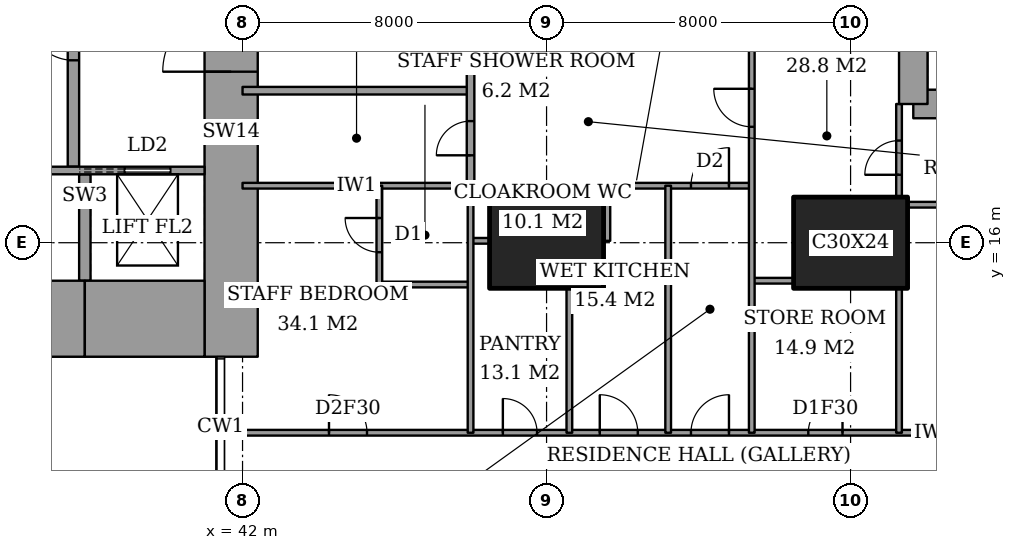
"""IFC4 building model, lengths in metres.
Left out: names, types, materials, properties, quantities, classifications, styles, units other than length and angle.
Written with IfcOpenShell. Run it as: python <this file> out.ifc"""

import sys

from ifc_helpers import new_model, si_unit, direction, frame, frame_2d, origin, origin_2d, place, context, subcontext, project, spatial, rectangle, extrude, element, fill, save


model = new_model("IFC4")
c1 = context("Model", 3, precision=1e-05, world=origin(), true_north=direction((0.0, 1.0)))
c2 = subcontext(c1, "Body", "Model", "MODEL_VIEW")
j1 = project(units=[si_unit("LENGTHUNIT", "METRE"), si_unit("PLANEANGLEUNIT", "RADIAN")], contexts=[c1])
p1 = place(None, origin())
s1 = spatial("IfcSite", under=j1, at=p1, CompositionType="ELEMENT")
p2 = place(p1, origin())
s2 = spatial("IfcBuilding", under=s1, at=p2, CompositionType="ELEMENT")
p3 = place(p2, frame((0.0, 0.0, 234.0)))
s3 = spatial("IfcBuildingStorey", under=s2, at=p3, CompositionType="ELEMENT", Elevation=234.0)
for number, where, z_axis, x_axis in (
    (1, (50.0, 16.0, 0.0), (0.0, 0.0, 1.0), (1.0, 0.0, 0.0)),
    (2, (58.0, 16.0, 0.0), (0.0, 0.0, 1.0), (1.0, 0.0, 0.0)),
):
    element("IfcColumn", number, at=place(p3, frame(where, z_axis=z_axis, x_axis=x_axis)), inside=s3, PredefinedType="COLUMN", context=c2, shape_type="SweptSolid", body=[
        extrude(rectangle(XDim=3.0, YDim=2.4, at=origin_2d()), origin(), (0.0, 0.0, 1.0), 3.6),
    ])
p4 = place(p3, frame((28.15, 14.0, 0.0), z_axis=(0.0, 0.0, 1.0), x_axis=(1.0, 0.0, 0.0)))
e3 = element("IfcWall", 3, at=p4, inside=s3, PredefinedType="SHEAR", context=c2, shape_type="SweptSolid", body=[
    extrude(rectangle(XDim=9.7, YDim=2.0, at=frame_2d((4.85, 0.0))), origin(), (0.0, 0.0, 1.0), 3.6),
])
p5 = place(p3, frame((37.85, 14.0, 0.0), z_axis=(0.0, 0.0, 1.0), x_axis=(1.0, 0.0, 0.0)))
e4 = element("IfcWall", 4, at=p5, inside=s3, PredefinedType="SHEAR", context=c2, shape_type="SweptSolid", body=[
    extrude(rectangle(XDim=3.15, YDim=2.0, at=frame_2d((1.575, 0.0))), origin(), (0.0, 0.0, 1.0), 3.6),
])
p6 = place(p3, frame((41.7, 13.0, 0.0), z_axis=(0.0, 0.0, 1.0), x_axis=(0.0, 1.0, 0.0)))
e5 = element("IfcWall", 5, at=p6, inside=s3, PredefinedType="SHEAR", context=c2, shape_type="SweptSolid", body=[
    extrude(rectangle(XDim=11.85, YDim=1.4, at=frame_2d((5.925, 0.0))), origin(), (0.0, 0.0, 1.0), 3.6),
])
p7 = place(p6, frame((7.5, 0.0, 0.0)))
e6 = element("IfcOpeningElement", 6, at=p7, cuts=e5, PredefinedType="OPENING", context=c2, shape_type="SweptSolid", body=[
    extrude(rectangle(XDim=1.8, YDim=2.4, at=frame_2d((0.9, 1.2))), frame((0.0, 0.71, 0.0), z_axis=(0.0, -1.0, 0.0), x_axis=(1.0, 0.0, 0.0)), (0.0, 0.0, 1.0), 1.42),
])
p8 = place(p3, frame((37.55, 18.0, 0.0), z_axis=(0.0, 0.0, 1.0), x_axis=(0.0, 1.0, 0.0)))
e7 = element("IfcWall", 7, at=p8, inside=s3, PredefinedType="PARTITIONING", context=c2, shape_type="SweptSolid", body=[
    extrude(rectangle(XDim=6.7, YDim=0.3, at=frame_2d((3.35, 0.0))), origin(), (0.0, 0.0, 1.0), 3.6),
])
p9 = place(p8, frame((2.8, 0.0, 0.0)))
e8 = element("IfcOpeningElement", 8, at=p9, cuts=e7, PredefinedType="OPENING", context=c2, shape_type="SweptSolid", body=[
    extrude(rectangle(XDim=1.2, YDim=2.1, at=frame_2d((0.6, 1.05))), frame((0.0, 0.16, 0.0), z_axis=(0.0, -1.0, 0.0), x_axis=(1.0, 0.0, 0.0)), (0.0, 0.0, 1.0), 0.32),
])
p10 = place(p3, frame((59.65, 19.65, 0.0), z_axis=(0.0, 0.0, 1.0), x_axis=(1.0, 0.0, 0.0)))
e9 = element("IfcWall", 9, at=p10, inside=s3, PredefinedType="SHEAR", context=c2, shape_type="SweptSolid", body=[
    extrude(rectangle(XDim=4.45, YDim=0.75, at=frame_2d((2.225, 0.0))), origin(), (0.0, 0.0, 1.0), 3.6),
])
p11 = place(p3, frame((59.65, 28.35, 0.0), z_axis=(0.0, 0.0, 1.0), x_axis=(0.0, -1.0, 0.0)))
e10 = element("IfcWall", 10, at=p11, inside=s3, PredefinedType="SHEAR", context=c2, shape_type="SweptSolid", body=[
    extrude(rectangle(XDim=8.7, YDim=0.75, at=frame_2d((4.35, 0.0))), origin(), (0.0, 0.0, 1.0), 3.6),
])
p12 = place(p11, frame((0.975, 0.0, 0.0)))
e11 = element("IfcOpeningElement", 11, at=p12, cuts=e10, PredefinedType="OPENING", context=c2, shape_type="SweptSolid", body=[
    extrude(rectangle(XDim=1.0, YDim=2.1, at=frame_2d((0.5, 1.05))), frame((0.0, 0.385, 0.0), z_axis=(0.0, -1.0, 0.0), x_axis=(1.0, 0.0, 0.0)), (0.0, 0.0, 1.0), 0.77),
])
p13 = place(p3, frame((41.439, 11.0, 0.0), z_axis=(0.0, 0.0, 1.0), x_axis=(1.0, 0.0, 0.0)))
e12 = element("IfcWall", 12, at=p13, inside=s3, PredefinedType="PARTITIONING", context=c2, shape_type="SweptSolid", body=[
    extrude(rectangle(XDim=25.011, YDim=0.15, at=frame_2d((12.505, 0.0))), origin(), (0.0, 0.0, 1.0), 3.35),
])
p14 = place(p13, frame((12.361, 0.0, 0.0)))
e13 = element("IfcOpeningElement", 13, at=p14, cuts=e12, PredefinedType="OPENING", context=c2, shape_type="SweptSolid", body=[
    extrude(rectangle(XDim=1.0, YDim=2.1, at=frame_2d((0.5, 1.05))), frame((0.0, 0.085, 0.0), z_axis=(0.0, -1.0, 0.0), x_axis=(1.0, 0.0, 0.0)), (0.0, 0.0, 1.0), 0.17),
])
p15 = place(p13, frame((20.924, 0.0, 0.0)))
e14 = element("IfcOpeningElement", 14, at=p15, cuts=e12, PredefinedType="OPENING", context=c2, shape_type="SweptSolid", body=[
    extrude(rectangle(XDim=1.0, YDim=2.1, at=frame_2d((0.5, 1.05))), frame((0.0, 0.085, 0.0), z_axis=(0.0, -1.0, 0.0), x_axis=(1.0, 0.0, 0.0)), (0.0, 0.0, 1.0), 0.17),
])
p16 = place(p13, frame((15.448, 0.0, 0.0)))
e15 = element("IfcOpeningElement", 15, at=p16, cuts=e12, PredefinedType="OPENING", context=c2, shape_type="SweptSolid", body=[
    extrude(rectangle(XDim=0.9, YDim=2.1, at=frame_2d((0.45, 1.05))), frame((0.0, 0.085, 0.0), z_axis=(0.0, -1.0, 0.0), x_axis=(1.0, 0.0, 0.0)), (0.0, 0.0, 1.0), 0.17),
])
p17 = place(p13, frame((9.961, 0.0, 0.0)))
e16 = element("IfcOpeningElement", 16, at=p17, cuts=e12, PredefinedType="OPENING", context=c2, shape_type="SweptSolid", body=[
    extrude(rectangle(XDim=1.0, YDim=2.1, at=frame_2d((0.5, 1.05))), frame((0.0, 0.085, 0.0), z_axis=(0.0, -1.0, 0.0), x_axis=(1.0, 0.0, 0.0)), (0.0, 0.0, 1.0), 0.17),
])
p18 = place(p13, frame((7.411, 0.0, 0.0)))
e17 = element("IfcOpeningElement", 17, at=p18, cuts=e12, PredefinedType="OPENING", context=c2, shape_type="SweptSolid", body=[
    extrude(rectangle(XDim=0.9, YDim=2.1, at=frame_2d((0.45, 1.05))), frame((0.0, 0.085, 0.0), z_axis=(0.0, -1.0, 0.0), x_axis=(1.0, 0.0, 0.0)), (0.0, 0.0, 1.0), 0.17),
])
p19 = place(p13, frame((2.836, 0.0, 0.0)))
e18 = element("IfcOpeningElement", 18, at=p19, cuts=e12, PredefinedType="OPENING", context=c2, shape_type="SweptSolid", body=[
    extrude(rectangle(XDim=1.0, YDim=2.1, at=frame_2d((0.5, 1.05))), frame((0.0, 0.085, 0.0), z_axis=(0.0, -1.0, 0.0), x_axis=(1.0, 0.0, 0.0)), (0.0, 0.0, 1.0), 0.17),
])
p20 = place(p3, frame((45.6, 14.9, 0.0), z_axis=(0.0, 0.0, 1.0), x_axis=(1.0, 0.0, 0.0)))
e19 = element("IfcWall", 19, at=p20, inside=s3, PredefinedType="PARTITIONING", context=c2, shape_type="SweptSolid", body=[
    extrude(rectangle(XDim=2.4, YDim=0.15, at=frame_2d((1.2, 0.0))), origin(), (0.0, 0.0, 1.0), 3.35),
])
p21 = place(p3, frame((55.4, 15.0, 0.0), z_axis=(0.0, 0.0, 1.0), x_axis=(1.0, 0.0, 0.0)))
e20 = element("IfcWall", 20, at=p21, inside=s3, PredefinedType="PARTITIONING", context=c2, shape_type="SweptSolid", body=[
    extrude(rectangle(XDim=1.1, YDim=0.15, at=frame_2d((0.55, 0.0))), origin(), (0.0, 0.0, 1.0), 3.35),
])
p22 = place(p3, frame((48.0, 16.05, 0.0), z_axis=(0.0, 0.0, 1.0), x_axis=(1.0, 0.0, 0.0)))
e21 = element("IfcWall", 21, at=p22, inside=s3, PredefinedType="PARTITIONING", context=c2, shape_type="SweptSolid", body=[
    extrude(rectangle(XDim=0.5, YDim=0.15, at=frame_2d((0.25, 0.0))), origin(), (0.0, 0.0, 1.0), 2.634),
])
p23 = place(p3, frame((59.5, 17.0, 0.0), z_axis=(0.0, 0.0, 1.0), x_axis=(1.0, 0.0, 0.0)))
e22 = element("IfcWall", 22, at=p23, inside=s3, PredefinedType="PARTITIONING", context=c2, shape_type="SweptSolid", body=[
    extrude(rectangle(XDim=6.95, YDim=0.15, at=frame_2d((3.475, 0.0))), origin(), (0.0, 0.0, 1.0), 3.35),
])
p24 = place(p3, frame((42.0, 17.5, 0.0), z_axis=(0.0, 0.0, 1.0), x_axis=(1.0, 0.0, 0.0)))
e23 = element("IfcWall", 23, at=p24, inside=s3, PredefinedType="PARTITIONING", context=c2, shape_type="SweptSolid", body=[
    extrude(rectangle(XDim=6.0, YDim=0.15, at=frame_2d((3.0, 0.0))), origin(), (0.0, 0.0, 1.0), 3.35),
])
p25 = place(p3, frame((51.6, 17.5, 0.0), z_axis=(0.0, 0.0, 1.0), x_axis=(1.0, 0.0, 0.0)))
e24 = element("IfcWall", 24, at=p25, inside=s3, PredefinedType="PARTITIONING", context=c2, shape_type="SweptSolid", body=[
    extrude(rectangle(XDim=3.8, YDim=0.15, at=frame_2d((1.9, 0.0))), origin(), (0.0, 0.0, 1.0), 3.35),
])
p26 = place(p25, frame((2.2, 0.0, 0.0)))
e25 = element("IfcOpeningElement", 25, at=p26, cuts=e24, PredefinedType="OPENING", context=c2, shape_type="SweptSolid", body=[
    extrude(rectangle(XDim=1.0, YDim=2.1, at=frame_2d((0.5, 1.05))), frame((0.0, 0.085, 0.0), z_axis=(0.0, -1.0, 0.0), x_axis=(1.0, 0.0, 0.0)), (0.0, 0.0, 1.0), 0.17),
])
p27 = place(p3, frame((42.0, 20.0, 0.0), z_axis=(0.0, 0.0, 1.0), x_axis=(1.0, 0.0, 0.0)))
e26 = element("IfcWall", 26, at=p27, inside=s3, PredefinedType="PARTITIONING", context=c2, shape_type="SweptSolid", body=[
    extrude(rectangle(XDim=6.0, YDim=0.2, at=frame_2d((3.0, 0.0))), origin(), (0.0, 0.0, 1.0), 3.35),
])
p28 = place(p3, frame((45.6, 14.9, 0.0), z_axis=(0.0, 0.0, 1.0), x_axis=(0.0, 1.0, 0.0)))
e27 = element("IfcWall", 27, at=p28, inside=s3, PredefinedType="PARTITIONING", context=c2, shape_type="SweptSolid", body=[
    extrude(rectangle(XDim=2.6, YDim=0.15, at=frame_2d((1.3, 0.0))), origin(), (0.0, 0.0, 1.0), 3.35),
])
p29 = place(p28, frame((0.85, 0.0, 0.0)))
e28 = element("IfcOpeningElement", 28, at=p29, cuts=e27, PredefinedType="OPENING", context=c2, shape_type="SweptSolid", body=[
    extrude(rectangle(XDim=0.9, YDim=2.1, at=frame_2d((0.45, 1.05))), frame((0.0, 0.085, 0.0), z_axis=(0.0, -1.0, 0.0), x_axis=(1.0, 0.0, 0.0)), (0.0, 0.0, 1.0), 0.17),
])
p30 = place(p3, frame((48.0, 17.5, 0.0), z_axis=(0.0, 0.0, 1.0), x_axis=(0.0, 1.0, 0.0)))
e29 = element("IfcWall", 29, at=p30, inside=s3, PredefinedType="PARTITIONING", context=c2, shape_type="SweptSolid", body=[
    extrude(rectangle(XDim=6.5, YDim=0.2, at=frame_2d((3.25, 0.0))), origin(), (0.0, 0.0, 1.0), 3.35),
])
p31 = place(p30, frame((3.9, 0.0, 0.0)))
e30 = element("IfcOpeningElement", 30, at=p31, cuts=e29, PredefinedType="OPENING", context=c2, shape_type="SweptSolid", body=[
    extrude(rectangle(XDim=1.2, YDim=2.4, at=frame_2d((0.6, 1.2))), frame((0.0, 0.11, 0.0), z_axis=(0.0, -1.0, 0.0), x_axis=(1.0, 0.0, 0.0)), (0.0, 0.0, 1.0), 0.22),
])
p32 = place(p30, frame((0.8, 0.0, 0.0)))
e31 = element("IfcOpeningElement", 31, at=p32, cuts=e29, PredefinedType="OPENING", context=c2, shape_type="SweptSolid", body=[
    extrude(rectangle(XDim=0.9, YDim=2.1, at=frame_2d((0.45, 1.05))), frame((0.0, 0.11, 0.0), z_axis=(0.0, -1.0, 0.0), x_axis=(1.0, 0.0, 0.0)), (0.0, 0.0, 1.0), 0.22),
])
p33 = place(p3, frame((48.0, 11.0, 0.0), z_axis=(0.0, 0.0, 1.0), x_axis=(0.0, 1.0, 0.0)))
e32 = element("IfcWall", 32, at=p33, inside=s3, PredefinedType="PARTITIONING", context=c2, shape_type="SweptSolid", body=[
    extrude(rectangle(XDim=6.5, YDim=0.15, at=frame_2d((3.25, 0.0))), origin(), (0.0, 0.0, 1.0), 3.35),
])
p34 = place(p3, frame((50.6, 11.0, 0.0), z_axis=(0.0, 0.0, 1.0), x_axis=(0.0, 1.0, 0.0)))
e33 = element("IfcWall", 33, at=p34, inside=s3, PredefinedType="PARTITIONING", context=c2, shape_type="SweptSolid", body=[
    extrude(rectangle(XDim=3.8, YDim=0.15, at=frame_2d((1.9, 0.0))), origin(), (0.0, 0.0, 1.0), 3.35),
])
p35 = place(p3, frame((51.6, 16.05, 0.0), z_axis=(0.0, 0.0, 1.0), x_axis=(0.0, 1.0, 0.0)))
e34 = element("IfcWall", 34, at=p35, inside=s3, PredefinedType="PARTITIONING", context=c2, shape_type="SweptSolid", body=[
    extrude(rectangle(XDim=1.45, YDim=0.15, at=frame_2d((0.725, 0.0))), origin(), (0.0, 0.0, 1.0), 3.35),
])
p36 = place(p3, frame((53.2, 11.0, 0.0), z_axis=(0.0, 0.0, 1.0), x_axis=(0.0, 1.0, 0.0)))
e35 = element("IfcWall", 35, at=p36, inside=s3, PredefinedType="PARTITIONING", context=c2, shape_type="SweptSolid", body=[
    extrude(rectangle(XDim=6.5, YDim=0.15, at=frame_2d((3.25, 0.0))), origin(), (0.0, 0.0, 1.0), 3.35),
])
p37 = place(p3, frame((55.4, 11.0, 0.0), z_axis=(0.0, 0.0, 1.0), x_axis=(0.0, 1.0, 0.0)))
e36 = element("IfcWall", 36, at=p37, inside=s3, PredefinedType="PARTITIONING", context=c2, shape_type="SweptSolid", body=[
    extrude(rectangle(XDim=10.6, YDim=0.15, at=frame_2d((5.3, 0.0))), origin(), (0.0, 0.0, 1.0), 3.35),
])
p38 = place(p37, frame((8.05, 0.0, 0.0)))
e37 = element("IfcOpeningElement", 37, at=p38, cuts=e36, PredefinedType="OPENING", context=c2, shape_type="SweptSolid", body=[
    extrude(rectangle(XDim=1.0, YDim=2.1, at=frame_2d((0.5, 1.05))), frame((0.0, 0.085, 0.0), z_axis=(0.0, -1.0, 0.0), x_axis=(1.0, 0.0, 0.0)), (0.0, 0.0, 1.0), 0.17),
])
p39 = place(p3, frame((59.275, 11.0, 0.0), z_axis=(0.0, 0.0, 1.0), x_axis=(0.0, 1.0, 0.0)))
e38 = element("IfcWall", 38, at=p39, inside=s3, PredefinedType="PARTITIONING", context=c2, shape_type="SweptSolid", body=[
    extrude(rectangle(XDim=3.8, YDim=0.15, at=frame_2d((1.9, 0.0))), origin(), (0.0, 0.0, 1.0), 3.35),
])
p40 = place(p3, frame((59.275, 17.2, 0.0), z_axis=(0.0, 0.0, 1.0), x_axis=(0.0, 1.0, 0.0)))
e39 = element("IfcWall", 39, at=p40, inside=s3, PredefinedType="PARTITIONING", context=c2, shape_type="SweptSolid", body=[
    extrude(rectangle(XDim=2.45, YDim=0.15, at=frame_2d((1.225, 0.0))), origin(), (0.0, 0.0, 1.0), 3.35),
])
p41 = place(p40, frame((0.587, 0.0, 0.0)))
e40 = element("IfcOpeningElement", 40, at=p41, cuts=e39, PredefinedType="OPENING", context=c2, shape_type="SweptSolid", body=[
    extrude(rectangle(XDim=0.9, YDim=2.1, at=frame_2d((0.45, 1.05))), frame((0.0, 0.085, 0.0), z_axis=(0.0, -1.0, 0.0), x_axis=(1.0, 0.0, 0.0)), (0.0, 0.0, 1.0), 0.17),
])
p42 = place(p3, frame((28.3, 17.9, 0.0), z_axis=(0.0, 0.0, 1.0), x_axis=(1.0, 0.0, 0.0)))
e41 = element("IfcWall", 41, at=p42, inside=s3, PredefinedType="PARTITIONING", context=c2, shape_type="SweptSolid", body=[
    extrude(rectangle(XDim=12.7, YDim=0.2, at=frame_2d((6.35, 0.0))), origin(), (0.0, 0.0, 1.0), 3.6),
])
p43 = place(p42, frame((1.0, 0.0, 0.0)))
e42 = element("IfcOpeningElement", 42, at=p43, cuts=e41, PredefinedType="OPENING", context=c2, shape_type="SweptSolid", body=[
    extrude(rectangle(XDim=1.0, YDim=2.1, at=frame_2d((0.5, 1.05))), frame((0.0, 0.11, 0.0), z_axis=(0.0, -1.0, 0.0), x_axis=(1.0, 0.0, 0.0)), (0.0, 0.0, 1.0), 0.22),
])
p44 = place(p42, frame((10.6, 0.0, 0.0)))
e43 = element("IfcOpeningElement", 43, at=p44, cuts=e41, PredefinedType="OPENING", context=c2, shape_type="SweptSolid", body=[
    extrude(rectangle(XDim=1.2, YDim=2.1, at=frame_2d((0.6, 1.05))), frame((0.0, 0.11, 0.0), z_axis=(0.0, -1.0, 0.0), x_axis=(1.0, 0.0, 0.0)), (0.0, 0.0, 1.0), 0.22),
])
p45 = place(p3, frame((37.85, 15.0, 0.0), z_axis=(0.0, 0.0, 1.0), x_axis=(0.0, 1.0, 0.0)))
e44 = element("IfcWall", 44, at=p45, inside=s3, PredefinedType="SHEAR", context=c2, shape_type="SweptSolid", body=[
    extrude(rectangle(XDim=2.8, YDim=0.3, at=frame_2d((1.4, 0.0))), origin(), (0.0, 0.0, 1.0), 3.6),
])
p46 = place(p14, origin())
e45 = element("IfcDoor", 45, at=p46, inside=s3, OperationType="SINGLE_SWING_LEFT", PredefinedType="DOOR", context=c2, shape_type="SweptSolid", body=[
    extrude(rectangle(XDim=1.0, YDim=2.1, at=frame_2d((0.5, 1.05))), frame((0.0, 0.025, 0.0), z_axis=(0.0, -1.0, 0.0), x_axis=(1.0, 0.0, 0.0)), (0.0, 0.0, 1.0), 0.05),
])
fill(e13, e45)
p47 = place(p41, origin())
e46 = element("IfcDoor", 46, at=p47, inside=s3, OperationType="SINGLE_SWING_RIGHT", PredefinedType="DOOR", context=c2, shape_type="SweptSolid", body=[
    extrude(rectangle(XDim=0.9, YDim=2.1, at=frame_2d((0.45, 1.05))), frame((0.0, 0.025, 0.0), z_axis=(0.0, -1.0, 0.0), x_axis=(1.0, 0.0, 0.0)), (0.0, 0.0, 1.0), 0.05),
])
fill(e40, e46)
p48 = place(p16, origin())
e47 = element("IfcDoor", 47, at=p48, inside=s3, OperationType="SINGLE_SWING_LEFT", PredefinedType="DOOR", context=c2, shape_type="SweptSolid", body=[
    extrude(rectangle(XDim=0.9, YDim=2.1, at=frame_2d((0.45, 1.05))), frame((0.0, 0.025, 0.0), z_axis=(0.0, -1.0, 0.0), x_axis=(1.0, 0.0, 0.0)), (0.0, 0.0, 1.0), 0.05),
])
fill(e15, e47)
p49 = place(p38, origin())
e48 = element("IfcDoor", 48, at=p49, inside=s3, OperationType="SINGLE_SWING_LEFT", PredefinedType="DOOR", context=c2, shape_type="SweptSolid", body=[
    extrude(rectangle(XDim=1.0, YDim=2.1, at=frame_2d((0.5, 1.05))), frame((0.0, 0.025, 0.0), z_axis=(0.0, -1.0, 0.0), x_axis=(1.0, 0.0, 0.0)), (0.0, 0.0, 1.0), 0.05),
])
fill(e37, e48)
p50 = place(p26, origin())
e49 = element("IfcDoor", 49, at=p50, inside=s3, OperationType="SINGLE_SWING_LEFT", PredefinedType="DOOR", context=c2, shape_type="SweptSolid", body=[
    extrude(rectangle(XDim=1.0, YDim=2.1, at=frame_2d((0.5, 1.05))), frame((0.0, 0.025, 0.0), z_axis=(0.0, -1.0, 0.0), x_axis=(1.0, 0.0, 0.0)), (0.0, 0.0, 1.0), 0.05),
])
fill(e25, e49)
p51 = place(p17, origin())
e50 = element("IfcDoor", 50, at=p51, inside=s3, OperationType="SINGLE_SWING_RIGHT", PredefinedType="DOOR", context=c2, shape_type="SweptSolid", body=[
    extrude(rectangle(XDim=1.0, YDim=2.1, at=frame_2d((0.5, 1.05))), frame((0.0, 0.025, 0.0), z_axis=(0.0, -1.0, 0.0), x_axis=(1.0, 0.0, 0.0)), (0.0, 0.0, 1.0), 0.05),
])
fill(e16, e50)
p52 = place(p18, origin())
e51 = element("IfcDoor", 51, at=p52, inside=s3, OperationType="SINGLE_SWING_RIGHT", PredefinedType="DOOR", context=c2, shape_type="SweptSolid", body=[
    extrude(rectangle(XDim=0.9, YDim=2.1, at=frame_2d((0.45, 1.05))), frame((0.0, 0.025, 0.0), z_axis=(0.0, -1.0, 0.0), x_axis=(1.0, 0.0, 0.0)), (0.0, 0.0, 1.0), 0.05),
])
fill(e17, e51)
p53 = place(p29, origin())
e52 = element("IfcDoor", 52, at=p53, inside=s3, OperationType="SINGLE_SWING_LEFT", PredefinedType="DOOR", context=c2, shape_type="SweptSolid", body=[
    extrude(rectangle(XDim=0.9, YDim=2.1, at=frame_2d((0.45, 1.05))), frame((0.0, 0.025, 0.0), z_axis=(0.0, -1.0, 0.0), x_axis=(1.0, 0.0, 0.0)), (0.0, 0.0, 1.0), 0.05),
])
fill(e28, e52)
p54 = place(p19, origin())
e53 = element("IfcDoor", 53, at=p54, inside=s3, OperationType="SINGLE_SWING_RIGHT", PredefinedType="DOOR", context=c2, shape_type="SweptSolid", body=[
    extrude(rectangle(XDim=1.0, YDim=2.1, at=frame_2d((0.5, 1.05))), frame((0.0, 0.025, 0.0), z_axis=(0.0, -1.0, 0.0), x_axis=(1.0, 0.0, 0.0)), (0.0, 0.0, 1.0), 0.05),
])
fill(e18, e53)
p55 = place(p32, origin())
e54 = element("IfcDoor", 54, at=p55, inside=s3, OperationType="SINGLE_SWING_RIGHT", PredefinedType="DOOR", context=c2, shape_type="SweptSolid", body=[
    extrude(rectangle(XDim=0.9, YDim=2.1, at=frame_2d((0.45, 1.05))), frame((0.0, 0.025, 0.0), z_axis=(0.0, -1.0, 0.0), x_axis=(1.0, 0.0, 0.0)), (0.0, 0.0, 1.0), 0.05),
])
fill(e31, e54)
p56 = place(p9, origin())
e55 = element("IfcDoor", 55, at=p56, inside=s3, OperationType="SINGLE_SWING_LEFT", PredefinedType="DOOR", context=c2, shape_type="SweptSolid", body=[
    extrude(rectangle(XDim=1.2, YDim=2.1, at=frame_2d((0.6, 1.05))), frame((0.0, 0.025, 0.0), z_axis=(0.0, -1.0, 0.0), x_axis=(1.0, 0.0, 0.0)), (0.0, 0.0, 1.0), 0.05),
])
fill(e8, e55)
p57 = place(p7, origin())
e56 = element("IfcDoor", 56, at=p57, inside=s3, OperationType="DOUBLE_DOOR_DOUBLE_SWING", PredefinedType="DOOR", context=c2, shape_type="SweptSolid", body=[
    extrude(rectangle(XDim=1.8, YDim=2.4, at=frame_2d((0.9, 1.2))), frame((0.0, 0.025, 0.0), z_axis=(0.0, -1.0, 0.0), x_axis=(1.0, 0.0, 0.0)), (0.0, 0.0, 1.0), 0.05),
])
fill(e6, e56)
p58 = place(p44, origin())
e57 = element("IfcDoor", 57, at=p58, inside=s3, OperationType="SLIDING_TO_LEFT", PredefinedType="DOOR", context=c2, shape_type="SweptSolid", body=[
    extrude(rectangle(XDim=1.2, YDim=2.1, at=frame_2d((0.6, 1.05))), frame((0.0, 0.025, 0.0), z_axis=(0.0, -1.0, 0.0), x_axis=(1.0, 0.0, 0.0)), (0.0, 0.0, 1.0), 0.05),
])
fill(e43, e57)
save(model, sys.argv[1])
